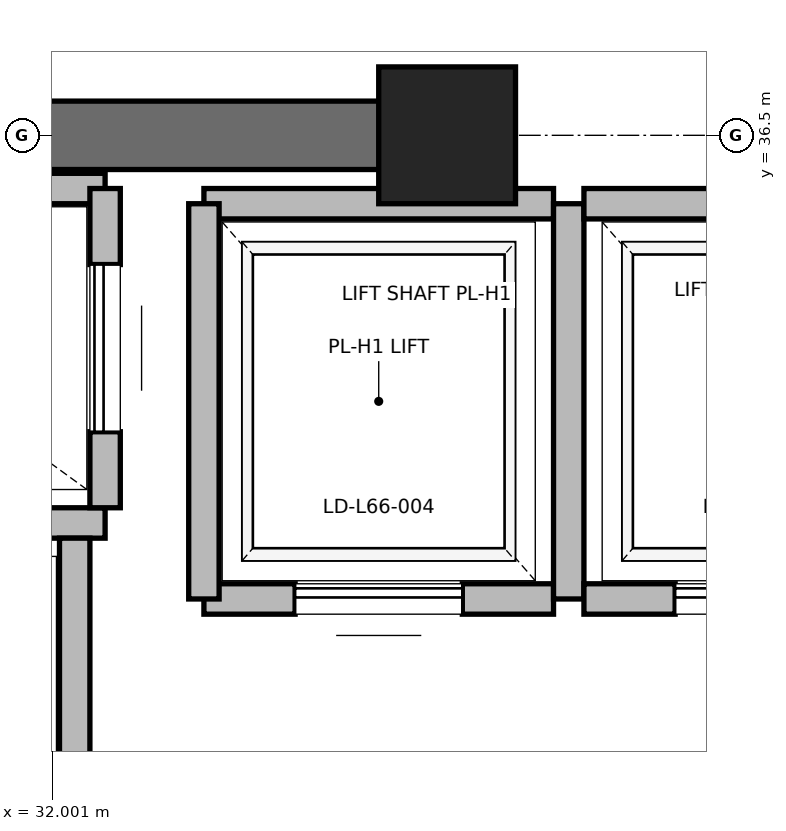
"""IFC4 building model, lengths in metres.
Left out: names, types, materials, properties, quantities, classifications, styles, units other than length and angle.
Written with IfcOpenShell. Run it as: python <this file> out.ifc"""

import sys

from ifc_helpers import new_model, si_unit, direction, frame, frame_2d, origin, origin_2d, place, context, subcontext, project, spatial, rectangle, extrude, element, fill, save


model = new_model("IFC4")
c1 = context("Model", 3, precision=1e-05, world=origin(), true_north=direction((0.0, 1.0)))
c2 = subcontext(c1, "Body", "Model", "MODEL_VIEW")
j1 = project(units=[si_unit("LENGTHUNIT", "METRE"), si_unit("PLANEANGLEUNIT", "RADIAN")], contexts=[c1])
p1 = place(None, origin())
s1 = spatial("IfcSite", under=j1, at=p1, CompositionType="ELEMENT")
p2 = place(p1, origin())
s2 = spatial("IfcBuilding", under=s1, at=p2, CompositionType="ELEMENT")
p3 = place(p2, frame((0.0, 0.0, 283.2)))
s3 = spatial("IfcBuildingStorey", under=s2, at=p3, CompositionType="ELEMENT", Elevation=283.2)
p4 = place(p3, frame((34.6, 36.5, 0.0), z_axis=(0.0, 0.0, 1.0), x_axis=(1.0, 0.0, 0.0)))
e1 = element("IfcColumn", 1, at=p4, inside=s3, PredefinedType="PILASTER", context=c2, shape_type="SweptSolid", body=[
    extrude(rectangle(XDim=0.9, YDim=0.9, at=origin_2d()), origin(), (0.0, 0.0, 1.0), 4.0),
])
p5 = place(p3, frame((29.0, 36.5, 0.0), z_axis=(0.0, 0.0, 1.0), x_axis=(1.0, 0.0, 0.0)))
e2 = element("IfcWall", 2, at=p5, inside=s3, PredefinedType="SHEAR", context=c2, shape_type="SweptSolid", body=[
    extrude(rectangle(XDim=5.8, YDim=0.45, at=frame_2d((2.9, 0.0))), origin(), (0.0, 0.0, 1.0), 3.785),
])
p6 = place(p3, frame((29.55, 33.95, 0.0), z_axis=(0.0, 0.0, 1.0), x_axis=(1.0, 0.0, 0.0)))
e3 = element("IfcWall", 3, at=p6, inside=s3, PredefinedType="SOLIDWALL", context=c2, shape_type="SweptSolid", body=[
    extrude(rectangle(XDim=2.8, YDim=0.2, at=frame_2d((1.4, 0.0))), origin(), (0.0, 0.0, 1.0), 3.785),
])
p7 = place(p3, frame((32.15, 30.85, 0.0), z_axis=(0.0, 0.0, 1.0), x_axis=(0.0, 1.0, 0.0)))
e4 = element("IfcWall", 4, at=p7, inside=s3, PredefinedType="SOLIDWALL", context=c2, shape_type="SweptSolid", body=[
    extrude(rectangle(XDim=3.0, YDim=0.2, at=frame_2d((1.5, 0.0))), origin(), (0.0, 0.0, 1.0), 3.785),
])
p8 = place(p3, frame((32.35, 36.15, 0.0), z_axis=(0.0, 0.0, 1.0), x_axis=(-1.0, 0.0, 0.0)))
e5 = element("IfcWall", 5, at=p8, inside=s3, PredefinedType="SOLIDWALL", context=c2, shape_type="SweptSolid", body=[
    extrude(rectangle(XDim=2.8, YDim=0.2, at=frame_2d((1.4, 0.0))), origin(), (0.0, 0.0, 1.0), 3.148),
])
p9 = place(p3, frame((32.35, 34.05, 0.0), z_axis=(0.0, 0.0, 1.0), x_axis=(0.0, 1.0, 0.0)))
e6 = element("IfcWall", 6, at=p9, inside=s3, PredefinedType="SOLIDWALL", context=c2, shape_type="SweptSolid", body=[
    extrude(rectangle(XDim=2.1, YDim=0.2, at=frame_2d((1.05, 0.0))), origin(), (0.0, 0.0, 1.0), 3.785),
])
p10 = place(p9, frame((0.5, 0.0, 0.0)))
e7 = element("IfcOpeningElement", 7, at=p10, cuts=e6, PredefinedType="OPENING", context=c2, shape_type="SweptSolid", body=[
    extrude(rectangle(XDim=1.1, YDim=2.2, at=frame_2d((0.55, 1.1))), frame((0.0, 0.1, 0.0), z_axis=(0.0, -1.0, 0.0), x_axis=(1.0, 0.0, 0.0)), (0.0, 0.0, 1.0), 0.2),
])
p11 = place(p3, frame((33.0, 33.45, 0.0), z_axis=(0.0, 0.0, 1.0), x_axis=(1.0, 0.0, 0.0)))
e8 = element("IfcWall", 8, at=p11, inside=s3, PredefinedType="SOLIDWALL", context=c2, shape_type="SweptSolid", body=[
    extrude(rectangle(XDim=2.3, YDim=0.2, at=frame_2d((1.15, 0.0))), origin(), (0.0, 0.0, 1.0), 3.785),
])
p12 = place(p11, frame((0.6, 0.0, 0.0)))
e9 = element("IfcOpeningElement", 9, at=p12, cuts=e8, PredefinedType="OPENING", context=c2, shape_type="SweptSolid", body=[
    extrude(rectangle(XDim=1.1, YDim=2.2, at=frame_2d((0.55, 1.1))), frame((0.0, 0.1, 0.0), z_axis=(0.0, -1.0, 0.0), x_axis=(1.0, 0.0, 0.0)), (0.0, 0.0, 1.0), 0.2),
])
p13 = place(p3, frame((35.3, 36.05, 0.0), z_axis=(0.0, 0.0, 1.0), x_axis=(-1.0, 0.0, 0.0)))
e10 = element("IfcWall", 10, at=p13, inside=s3, PredefinedType="SOLIDWALL", context=c2, shape_type="SweptSolid", body=[
    extrude(rectangle(XDim=2.3, YDim=0.2, at=frame_2d((1.15, 0.0))), origin(), (0.0, 0.0, 1.0), 2.865),
])
p14 = place(p3, frame((33.0, 36.05, 0.0), z_axis=(0.0, 0.0, 1.0), x_axis=(0.0, -1.0, 0.0)))
e11 = element("IfcWall", 11, at=p14, inside=s3, PredefinedType="SOLIDWALL", context=c2, shape_type="SweptSolid", body=[
    extrude(rectangle(XDim=2.6, YDim=0.2, at=frame_2d((1.3, 0.0))), origin(), (0.0, 0.0, 1.0), 3.785),
])
p15 = place(p3, frame((35.4, 33.45, 0.0), z_axis=(0.0, 0.0, 1.0), x_axis=(0.0, 1.0, 0.0)))
e12 = element("IfcWall", 12, at=p15, inside=s3, PredefinedType="SOLIDWALL", context=c2, shape_type="SweptSolid", body=[
    extrude(rectangle(XDim=2.6, YDim=0.2, at=frame_2d((1.3, 0.0))), origin(), (0.0, 0.0, 1.0), 2.865),
])
p16 = place(p3, frame((35.5, 33.45, 0.0), z_axis=(0.0, 0.0, 1.0), x_axis=(1.0, 0.0, 0.0)))
e13 = element("IfcWall", 13, at=p16, inside=s3, PredefinedType="SOLIDWALL", context=c2, shape_type="SweptSolid", body=[
    extrude(rectangle(XDim=2.3, YDim=0.2, at=frame_2d((1.15, 0.0))), origin(), (0.0, 0.0, 1.0), 3.785),
])
p17 = place(p16, frame((0.6, 0.0, 0.0)))
e14 = element("IfcOpeningElement", 14, at=p17, cuts=e13, PredefinedType="OPENING", context=c2, shape_type="SweptSolid", body=[
    extrude(rectangle(XDim=1.1, YDim=2.2, at=frame_2d((0.55, 1.1))), frame((0.0, 0.1, 0.0), z_axis=(0.0, -1.0, 0.0), x_axis=(1.0, 0.0, 0.0)), (0.0, 0.0, 1.0), 0.2),
])
p18 = place(p3, frame((37.8, 36.05, 0.0), z_axis=(0.0, 0.0, 1.0), x_axis=(-1.0, 0.0, 0.0)))
e15 = element("IfcWall", 15, at=p18, inside=s3, PredefinedType="SOLIDWALL", context=c2, shape_type="SweptSolid", body=[
    extrude(rectangle(XDim=2.3, YDim=0.2, at=frame_2d((1.15, 0.0))), origin(), (0.0, 0.0, 1.0), 2.865),
])
p19 = place(p10, origin())
e16 = element("IfcDoor", 16, at=p19, inside=s3, OperationType="SLIDING_TO_RIGHT", PredefinedType="DOOR", context=c2, shape_type="SweptSolid", body=[
    extrude(rectangle(XDim=1.1, YDim=2.2, at=frame_2d((0.55, 1.1))), frame((0.0, 0.025, 0.0), z_axis=(0.0, -1.0, 0.0), x_axis=(1.0, 0.0, 0.0)), (0.0, 0.0, 1.0), 0.05),
])
fill(e7, e16)
p20 = place(p12, origin())
e17 = element("IfcDoor", 17, at=p20, inside=s3, OperationType="SLIDING_TO_RIGHT", PredefinedType="DOOR", context=c2, shape_type="SweptSolid", body=[
    extrude(rectangle(XDim=1.1, YDim=2.2, at=frame_2d((0.55, 1.1))), frame((0.0, 0.025, 0.0), z_axis=(0.0, -1.0, 0.0), x_axis=(1.0, 0.0, 0.0)), (0.0, 0.0, 1.0), 0.05),
])
fill(e9, e17)
p21 = place(p17, origin())
e18 = element("IfcDoor", 18, at=p21, inside=s3, OperationType="SLIDING_TO_RIGHT", PredefinedType="DOOR", context=c2, shape_type="SweptSolid", body=[
    extrude(rectangle(XDim=1.1, YDim=2.2, at=frame_2d((0.55, 1.1))), frame((0.0, 0.025, 0.0), z_axis=(0.0, -1.0, 0.0), x_axis=(1.0, 0.0, 0.0)), (0.0, 0.0, 1.0), 0.05),
])
fill(e14, e18)
save(model, sys.argv[1])
